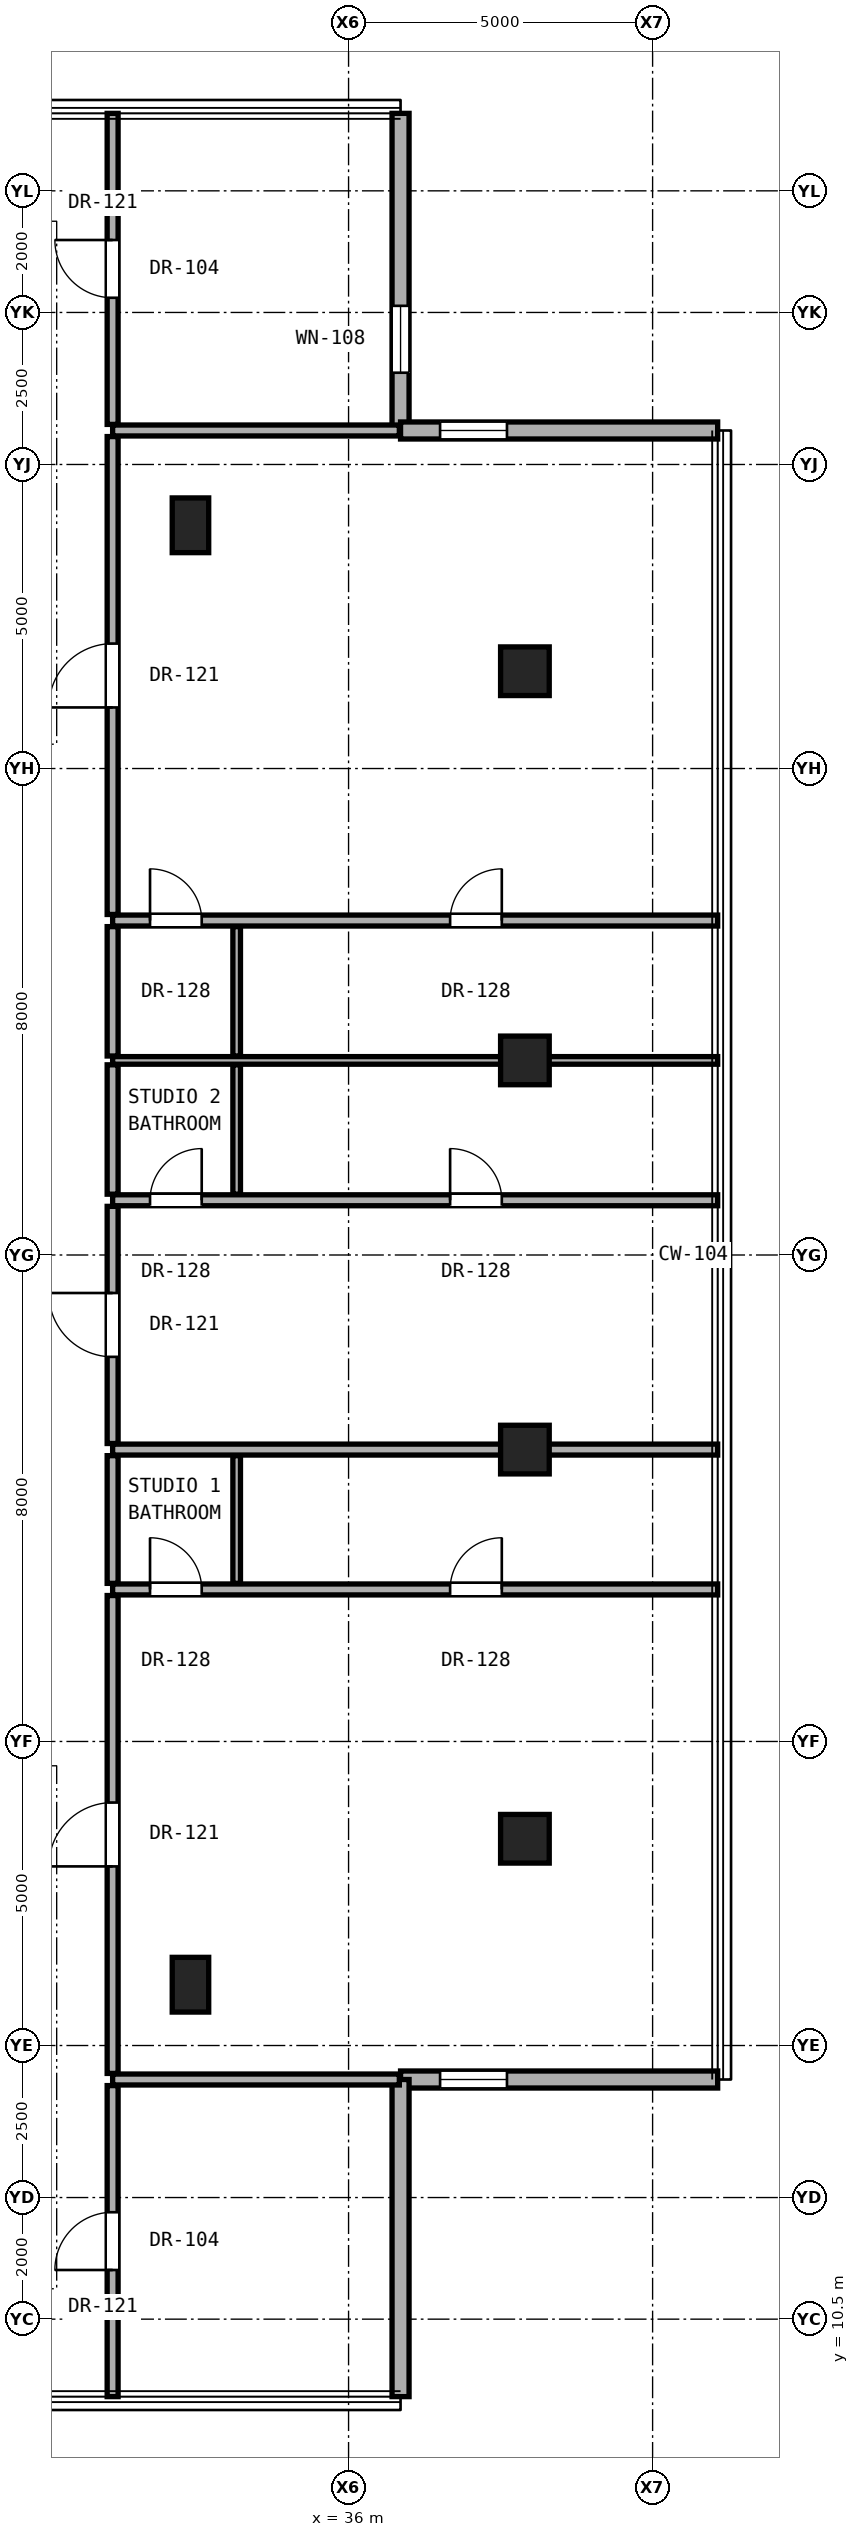
"""IFC4 building model, lengths in metres.
Left out: names, types, materials, properties, quantities, classifications, styles, units other than length and angle.
Written with IfcOpenShell. Run it as: python <this file> out.ifc"""

import sys

from ifc_helpers import new_model, si_unit, direction, frame, frame_2d, origin, origin_2d, place, context, subcontext, project, spatial, rectangle, hollow_rectangle, extrude, element, fill, save


model = new_model("IFC4")
c1 = context("Model", 3, precision=1e-05, world=origin(), true_north=direction((0.0, 1.0)))
c2 = subcontext(c1, "Body", "Model", "MODEL_VIEW")
j1 = project(units=[si_unit("LENGTHUNIT", "METRE"), si_unit("PLANEANGLEUNIT", "RADIAN")], contexts=[c1])
p1 = place(None, origin())
s1 = spatial("IfcSite", under=j1, at=p1, CompositionType="ELEMENT")
p2 = place(p1, origin())
s2 = spatial("IfcBuilding", under=s1, at=p2, CompositionType="ELEMENT")
p3 = place(p2, frame((0.0, 0.0, 209.65)))
s3 = spatial("IfcBuildingStorey", under=s2, at=p3, CompositionType="ELEMENT", Elevation=209.65)
for number, where, z_axis, x_axis in (
    (1, (38.9, 18.4, 0.0), (0.0, 0.0, 1.0), (1.0, 0.0, 0.0)),
    (2, (38.9, 24.8, 0.0), (0.0, 0.0, 1.0), (1.0, 0.0, 0.0)),
    (3, (38.9, 31.2, 0.0), (0.0, 0.0, 1.0), (1.0, 0.0, 0.0)),
    (4, (38.9, 37.6, 0.0), (0.0, 0.0, 1.0), (1.0, 0.0, 0.0)),
):
    element("IfcColumn", number, at=place(p3, frame(where, z_axis=z_axis, x_axis=x_axis)), inside=s3, PredefinedType="COLUMN", context=c2, shape_type="SweptSolid", body=[
        extrude(hollow_rectangle(XDim=0.8, YDim=0.8, WallThickness=0.045, at=origin_2d()), origin(), (0.0, 0.0, 1.0), 3.25),
    ])
for number, where, z_axis, x_axis in (
    (5, (33.4, 16.0, 0.0), (0.0, 0.0, 1.0), (1.0, 0.0, 0.0)),
    (6, (33.4, 40.0, 0.0), (0.0, 0.0, 1.0), (1.0, 0.0, 0.0)),
):
    element("IfcColumn", number, at=place(p3, frame(where, z_axis=z_axis, x_axis=x_axis)), inside=s3, PredefinedType="PILASTER", context=c2, shape_type="SweptSolid", body=[
        extrude(rectangle(XDim=0.6, YDim=0.9, at=origin_2d()), origin(), (0.0, 0.0, 1.0), 3.25),
    ])
p4 = place(p3, frame((36.855, 41.559, 0.0), z_axis=(0.0, 0.0, 1.0), x_axis=(0.0, 1.0, 0.0)))
e7 = element("IfcWall", 7, at=p4, inside=s3, PredefinedType="SOLIDWALL", context=c2, shape_type="SweptSolid", body=[
    extrude(rectangle(XDim=5.215, YDim=0.28, at=frame_2d((2.607, 0.0))), origin(), (0.0, 0.0, 1.0), 2.51),
])
p5 = place(p4, frame((0.95, 0.0, 0.36)))
e8 = element("IfcOpeningElement", 8, at=p5, cuts=e7, PredefinedType="OPENING", context=c2, shape_type="SweptSolid", body=[
    extrude(rectangle(XDim=1.1, YDim=2.0, at=frame_2d((0.55, 1.0))), frame((0.0, 0.15, 0.0), z_axis=(0.0, -1.0, 0.0), x_axis=(1.0, 0.0, 0.0)), (0.0, 0.0, 1.0), 0.3),
])
p6 = place(p3, frame((36.855, 14.441, 0.0), z_axis=(0.0, 0.0, 1.0), x_axis=(1.0, 0.0, 0.0)))
e9 = element("IfcWall", 9, at=p6, inside=s3, PredefinedType="SOLIDWALL", context=c2, shape_type="SweptSolid", body=[
    extrude(rectangle(XDim=5.215, YDim=0.28, at=frame_2d((2.607, 0.0))), origin(), (0.0, 0.0, 1.0), 2.51),
])
p7 = place(p6, frame((0.65, 0.0, 0.36)))
e10 = element("IfcOpeningElement", 10, at=p7, cuts=e9, PredefinedType="OPENING", context=c2, shape_type="SweptSolid", body=[
    extrude(rectangle(XDim=1.1, YDim=2.0, at=frame_2d((0.55, 1.0))), frame((0.0, 0.15, 0.0), z_axis=(0.0, -1.0, 0.0), x_axis=(1.0, 0.0, 0.0)), (0.0, 0.0, 1.0), 0.3),
])
p8 = place(p3, frame((36.855, 9.226, 0.0), z_axis=(0.0, 0.0, 1.0), x_axis=(0.0, 1.0, 0.0)))
e11 = element("IfcWall", 11, at=p8, inside=s3, PredefinedType="SOLIDWALL", context=c2, shape_type="SweptSolid", body=[
    extrude(rectangle(XDim=5.215, YDim=0.28, at=frame_2d((2.607, 0.0))), origin(), (0.0, 0.0, 1.0), 2.51),
])
p9 = place(p3, frame((42.07, 41.559, 0.0), z_axis=(0.0, 0.0, 1.0), x_axis=(-1.0, 0.0, 0.0)))
e12 = element("IfcWall", 12, at=p9, inside=s3, PredefinedType="SOLIDWALL", context=c2, shape_type="SweptSolid", body=[
    extrude(rectangle(XDim=5.215, YDim=0.28, at=frame_2d((2.607, 0.0))), origin(), (0.0, 0.0, 1.0), 2.51),
])
p10 = place(p9, frame((3.465, 0.0, 0.36)))
e13 = element("IfcOpeningElement", 13, at=p10, cuts=e12, PredefinedType="OPENING", context=c2, shape_type="SweptSolid", body=[
    extrude(rectangle(XDim=1.1, YDim=2.0, at=frame_2d((0.55, 1.0))), frame((0.0, 0.15, 0.0), z_axis=(0.0, -1.0, 0.0), x_axis=(1.0, 0.0, 0.0)), (0.0, 0.0, 1.0), 0.3),
])
p11 = place(p3, frame((32.12, 14.441, 0.0), z_axis=(0.0, 0.0, 1.0), x_axis=(1.0, 0.0, 0.0)))
e14 = element("IfcWall", 14, at=p11, inside=s3, PredefinedType="PARTITIONING", context=c2, shape_type="SweptSolid", body=[
    extrude(rectangle(XDim=4.715, YDim=0.18, at=frame_2d((2.357, 0.0))), origin(), (0.0, 0.0, 1.0), 2.89),
])
p12 = place(p3, frame((32.12, 22.5, 0.0), z_axis=(0.0, 0.0, 1.0), x_axis=(1.0, 0.0, 0.0)))
e15 = element("IfcWall", 15, at=p12, inside=s3, PredefinedType="PARTITIONING", context=c2, shape_type="SweptSolid", body=[
    extrude(rectangle(XDim=9.95, YDim=0.18, at=frame_2d((4.975, 0.0))), origin(), (0.0, 0.0, 1.0), 2.109),
])
p13 = place(p12, frame((5.55, 0.0, 0.0)))
e16 = element("IfcOpeningElement", 16, at=p13, cuts=e15, PredefinedType="OPENING", context=c2, shape_type="SweptSolid", body=[
    extrude(rectangle(XDim=0.85, YDim=2.01, at=frame_2d((0.425, 1.005))), frame((0.0, 0.1, 0.0), z_axis=(0.0, -1.0, 0.0), x_axis=(1.0, 0.0, 0.0)), (0.0, 0.0, 1.0), 0.2),
])
p14 = place(p12, frame((0.615, 0.0, 0.0)))
e17 = element("IfcOpeningElement", 17, at=p14, cuts=e15, PredefinedType="OPENING", context=c2, shape_type="SweptSolid", body=[
    extrude(rectangle(XDim=0.85, YDim=2.01, at=frame_2d((0.425, 1.005))), frame((0.0, 0.1, 0.0), z_axis=(0.0, -1.0, 0.0), x_axis=(1.0, 0.0, 0.0)), (0.0, 0.0, 1.0), 0.2),
])
p15 = place(p3, frame((32.12, 24.8, 0.0), z_axis=(0.0, 0.0, 1.0), x_axis=(1.0, 0.0, 0.0)))
e18 = element("IfcWall", 18, at=p15, inside=s3, PredefinedType="PARTITIONING", context=c2, shape_type="SweptSolid", body=[
    extrude(rectangle(XDim=9.95, YDim=0.18, at=frame_2d((4.975, 0.0))), origin(), (0.0, 0.0, 1.0), 2.109),
])
p16 = place(p3, frame((32.12, 28.9, 0.0), z_axis=(0.0, 0.0, 1.0), x_axis=(1.0, 0.0, 0.0)))
e19 = element("IfcWall", 19, at=p16, inside=s3, PredefinedType="PARTITIONING", context=c2, shape_type="SweptSolid", body=[
    extrude(rectangle(XDim=9.95, YDim=0.18, at=frame_2d((4.975, 0.0))), origin(), (0.0, 0.0, 1.0), 2.109),
])
p17 = place(p16, frame((5.55, 0.0, 0.0)))
e20 = element("IfcOpeningElement", 20, at=p17, cuts=e19, PredefinedType="OPENING", context=c2, shape_type="SweptSolid", body=[
    extrude(rectangle(XDim=0.85, YDim=2.01, at=frame_2d((0.425, 1.005))), frame((0.0, 0.1, 0.0), z_axis=(0.0, -1.0, 0.0), x_axis=(1.0, 0.0, 0.0)), (0.0, 0.0, 1.0), 0.2),
])
p18 = place(p16, frame((0.615, 0.0, 0.0)))
e21 = element("IfcOpeningElement", 21, at=p18, cuts=e19, PredefinedType="OPENING", context=c2, shape_type="SweptSolid", body=[
    extrude(rectangle(XDim=0.85, YDim=2.01, at=frame_2d((0.425, 1.005))), frame((0.0, 0.1, 0.0), z_axis=(0.0, -1.0, 0.0), x_axis=(1.0, 0.0, 0.0)), (0.0, 0.0, 1.0), 0.2),
])
p19 = place(p3, frame((32.12, 31.2, 0.0), z_axis=(0.0, 0.0, 1.0), x_axis=(1.0, 0.0, 0.0)))
e22 = element("IfcWall", 22, at=p19, inside=s3, PredefinedType="PARTITIONING", context=c2, shape_type="SweptSolid", body=[
    extrude(rectangle(XDim=9.95, YDim=0.125, at=frame_2d((4.975, 0.0))), origin(), (0.0, 0.0, 1.0), 2.109),
])
p20 = place(p3, frame((32.12, 33.5, 0.0), z_axis=(0.0, 0.0, 1.0), x_axis=(1.0, 0.0, 0.0)))
e23 = element("IfcWall", 23, at=p20, inside=s3, PredefinedType="PARTITIONING", context=c2, shape_type="SweptSolid", body=[
    extrude(rectangle(XDim=9.95, YDim=0.18, at=frame_2d((4.975, 0.0))), origin(), (0.0, 0.0, 1.0), 2.109),
])
p21 = place(p20, frame((5.55, 0.0, 0.0)))
e24 = element("IfcOpeningElement", 24, at=p21, cuts=e23, PredefinedType="OPENING", context=c2, shape_type="SweptSolid", body=[
    extrude(rectangle(XDim=0.85, YDim=2.01, at=frame_2d((0.425, 1.005))), frame((0.0, 0.1, 0.0), z_axis=(0.0, -1.0, 0.0), x_axis=(1.0, 0.0, 0.0)), (0.0, 0.0, 1.0), 0.2),
])
p22 = place(p20, frame((0.615, 0.0, 0.0)))
e25 = element("IfcOpeningElement", 25, at=p22, cuts=e23, PredefinedType="OPENING", context=c2, shape_type="SweptSolid", body=[
    extrude(rectangle(XDim=0.85, YDim=2.01, at=frame_2d((0.425, 1.005))), frame((0.0, 0.1, 0.0), z_axis=(0.0, -1.0, 0.0), x_axis=(1.0, 0.0, 0.0)), (0.0, 0.0, 1.0), 0.2),
])
p23 = place(p3, frame((32.12, 41.559, 0.0), z_axis=(0.0, 0.0, 1.0), x_axis=(1.0, 0.0, 0.0)))
e26 = element("IfcWall", 26, at=p23, inside=s3, PredefinedType="PARTITIONING", context=c2, shape_type="SweptSolid", body=[
    extrude(rectangle(XDim=4.715, YDim=0.18, at=frame_2d((2.357, 0.0))), origin(), (0.0, 0.0, 1.0), 2.89),
])
p24 = place(p3, frame((32.12, 9.226, 0.0), z_axis=(0.0, 0.0, 1.0), x_axis=(0.0, 1.0, 0.0)))
e27 = element("IfcWall", 27, at=p24, inside=s3, PredefinedType="PARTITIONING", context=c2, shape_type="SweptSolid", body=[
    extrude(rectangle(XDim=5.115, YDim=0.18, at=frame_2d((2.558, 0.0))), origin(), (0.0, 0.0, 1.0), 2.89),
])
p25 = place(p24, frame((2.083, 0.0, 0.0)))
e28 = element("IfcOpeningElement", 28, at=p25, cuts=e27, PredefinedType="OPENING", context=c2, shape_type="SweptSolid", body=[
    extrude(rectangle(XDim=0.95, YDim=2.15, at=frame_2d((0.475, 1.075))), frame((0.0, 0.1, 0.0), z_axis=(0.0, -1.0, 0.0), x_axis=(1.0, 0.0, 0.0)), (0.0, 0.0, 1.0), 0.2),
])
p26 = place(p3, frame((32.12, 14.541, 0.0), z_axis=(0.0, 0.0, 1.0), x_axis=(0.0, 1.0, 0.0)))
e29 = element("IfcWall", 29, at=p26, inside=s3, PredefinedType="PARTITIONING", context=c2, shape_type="SweptSolid", body=[
    extrude(rectangle(XDim=7.859, YDim=0.18, at=frame_2d((3.929, 0.0))), origin(), (0.0, 0.0, 1.0), 2.282),
])
p27 = place(p26, frame((3.405, 0.0, 0.0)))
e30 = element("IfcOpeningElement", 30, at=p27, cuts=e29, PredefinedType="OPENING", context=c2, shape_type="SweptSolid", body=[
    extrude(rectangle(XDim=1.05, YDim=2.2, at=frame_2d((0.525, 1.1))), frame((0.0, 0.1, 0.0), z_axis=(0.0, -1.0, 0.0), x_axis=(1.0, 0.0, 0.0)), (0.0, 0.0, 1.0), 0.2),
])
p28 = place(p3, frame((32.12, 22.6, 0.0), z_axis=(0.0, 0.0, 1.0), x_axis=(0.0, 1.0, 0.0)))
e31 = element("IfcWall", 31, at=p28, inside=s3, PredefinedType="PARTITIONING", context=c2, shape_type="SweptSolid", body=[
    extrude(rectangle(XDim=2.1, YDim=0.18, at=frame_2d((1.05, 0.0))), origin(), (0.0, 0.0, 1.0), 2.266),
])
p29 = place(p3, frame((32.12, 24.9, 0.0), z_axis=(0.0, 0.0, 1.0), x_axis=(0.0, 1.0, 0.0)))
e32 = element("IfcWall", 32, at=p29, inside=s3, PredefinedType="PARTITIONING", context=c2, shape_type="SweptSolid", body=[
    extrude(rectangle(XDim=3.9, YDim=0.18, at=frame_2d((1.95, 0.0))), origin(), (0.0, 0.0, 1.0), 2.266),
])
p30 = place(p29, frame((1.425, 0.0, 0.0)))
e33 = element("IfcOpeningElement", 33, at=p30, cuts=e32, PredefinedType="OPENING", context=c2, shape_type="SweptSolid", body=[
    extrude(rectangle(XDim=1.05, YDim=2.2, at=frame_2d((0.525, 1.1))), frame((0.0, 0.1, 0.0), z_axis=(0.0, -1.0, 0.0), x_axis=(1.0, 0.0, 0.0)), (0.0, 0.0, 1.0), 0.2),
])
for number, where, z_axis, x_axis in (
    (34, (32.12, 29.0, 0.0), (0.0, 0.0, 1.0), (0.0, 1.0, 0.0)),
    (35, (32.12, 31.272, 0.0), (0.0, 0.0, 1.0), (0.0, 1.0, 0.0)),
):
    element("IfcWall", number, at=place(p3, frame(where, z_axis=z_axis, x_axis=x_axis)), inside=s3, PredefinedType="PARTITIONING", context=c2, shape_type="SweptSolid", body=[
        extrude(rectangle(XDim=2.127, YDim=0.18, at=frame_2d((1.064, 0.0))), origin(), (0.0, 0.0, 1.0), 2.266),
    ])
p31 = place(p3, frame((32.12, 33.6, 0.0), z_axis=(0.0, 0.0, 1.0), x_axis=(0.0, 1.0, 0.0)))
e36 = element("IfcWall", 36, at=p31, inside=s3, PredefinedType="PARTITIONING", context=c2, shape_type="SweptSolid", body=[
    extrude(rectangle(XDim=7.859, YDim=0.18, at=frame_2d((3.929, 0.0))), origin(), (0.0, 0.0, 1.0), 2.282),
])
p32 = place(p31, frame((3.405, 0.0, 0.0)))
e37 = element("IfcOpeningElement", 37, at=p32, cuts=e36, PredefinedType="OPENING", context=c2, shape_type="SweptSolid", body=[
    extrude(rectangle(XDim=1.05, YDim=2.2, at=frame_2d((0.525, 1.1))), frame((0.0, 0.1, 0.0), z_axis=(0.0, -1.0, 0.0), x_axis=(1.0, 0.0, 0.0)), (0.0, 0.0, 1.0), 0.2),
])
p33 = place(p3, frame((32.12, 41.659, 0.0), z_axis=(0.0, 0.0, 1.0), x_axis=(0.0, 1.0, 0.0)))
e38 = element("IfcWall", 38, at=p33, inside=s3, PredefinedType="PARTITIONING", context=c2, shape_type="SweptSolid", body=[
    extrude(rectangle(XDim=5.115, YDim=0.18, at=frame_2d((2.558, 0.0))), origin(), (0.0, 0.0, 1.0), 2.89),
])
p34 = place(p33, frame((2.083, 0.0, 0.0)))
e39 = element("IfcOpeningElement", 39, at=p34, cuts=e38, PredefinedType="OPENING", context=c2, shape_type="SweptSolid", body=[
    extrude(rectangle(XDim=0.95, YDim=2.15, at=frame_2d((0.475, 1.075))), frame((0.0, 0.1, 0.0), z_axis=(0.0, -1.0, 0.0), x_axis=(1.0, 0.0, 0.0)), (0.0, 0.0, 1.0), 0.2),
])
p35 = place(p3, frame((34.16, 22.6, 0.0), z_axis=(0.0, 0.0, 1.0), x_axis=(0.0, 1.0, 0.0)))
e40 = element("IfcWall", 40, at=p35, inside=s3, PredefinedType="PARTITIONING", context=c2, shape_type="SweptSolid", body=[
    extrude(rectangle(XDim=2.1, YDim=0.125, at=frame_2d((1.05, 0.0))), origin(), (0.0, 0.0, 1.0), 2.266),
])
for number, where, z_axis, x_axis in (
    (41, (34.16, 29.0, 0.0), (0.0, 0.0, 1.0), (0.0, 1.0, 0.0)),
    (42, (34.16, 31.272, 0.0), (0.0, 0.0, 1.0), (0.0, 1.0, 0.0)),
):
    element("IfcWall", number, at=place(p3, frame(where, z_axis=z_axis, x_axis=x_axis)), inside=s3, PredefinedType="PARTITIONING", context=c2, shape_type="SweptSolid", body=[
        extrude(rectangle(XDim=2.127, YDim=0.125, at=frame_2d((1.064, 0.0))), origin(), (0.0, 0.0, 1.0), 2.266),
    ])
p36 = place(p5, origin())
e43 = element("IfcWindow", 43, at=p36, inside=s3, PartitioningType="SINGLE_PANEL", PredefinedType="WINDOW", context=c2, shape_type="SweptSolid", body=[
    extrude(rectangle(XDim=1.1, YDim=2.0, at=frame_2d((0.55, 1.0))), frame((0.0, 0.03, 0.0), z_axis=(0.0, -1.0, 0.0), x_axis=(1.0, 0.0, 0.0)), (0.0, 0.0, 1.0), 0.06),
])
fill(e8, e43)
p37 = place(p7, origin())
e44 = element("IfcWindow", 44, at=p37, inside=s3, PartitioningType="SINGLE_PANEL", PredefinedType="WINDOW", context=c2, shape_type="SweptSolid", body=[
    extrude(rectangle(XDim=1.1, YDim=2.0, at=frame_2d((0.55, 1.0))), frame((0.0, 0.03, 0.0), z_axis=(0.0, -1.0, 0.0), x_axis=(1.0, 0.0, 0.0)), (0.0, 0.0, 1.0), 0.06),
])
fill(e10, e44)
p38 = place(p10, origin())
e45 = element("IfcWindow", 45, at=p38, inside=s3, PartitioningType="SINGLE_PANEL", PredefinedType="WINDOW", context=c2, shape_type="SweptSolid", body=[
    extrude(rectangle(XDim=1.1, YDim=2.0, at=frame_2d((0.55, 1.0))), frame((0.0, 0.03, 0.0), z_axis=(0.0, -1.0, 0.0), x_axis=(1.0, 0.0, 0.0)), (0.0, 0.0, 1.0), 0.06),
])
fill(e13, e45)
p39 = place(p27, origin())
e46 = element("IfcDoor", 46, at=p39, inside=s3, OperationType="SINGLE_SWING_LEFT", PredefinedType="DOOR", context=c2, shape_type="SweptSolid", body=[
    extrude(rectangle(XDim=1.05, YDim=2.2, at=frame_2d((0.525, 1.1))), frame((0.0, 0.025, 0.0), z_axis=(0.0, -1.0, 0.0), x_axis=(1.0, 0.0, 0.0)), (0.0, 0.0, 1.0), 0.05),
])
fill(e30, e46)
p40 = place(p13, origin())
e47 = element("IfcDoor", 47, at=p40, inside=s3, OperationType="SINGLE_SWING_RIGHT", PredefinedType="DOOR", context=c2, shape_type="SweptSolid", body=[
    extrude(rectangle(XDim=0.85, YDim=2.01, at=frame_2d((0.425, 1.005))), frame((0.0, 0.025, 0.0), z_axis=(0.0, -1.0, 0.0), x_axis=(1.0, 0.0, 0.0)), (0.0, 0.0, 1.0), 0.05),
])
fill(e16, e47)
p41 = place(p14, origin())
e48 = element("IfcDoor", 48, at=p41, inside=s3, OperationType="SINGLE_SWING_LEFT", PredefinedType="DOOR", context=c2, shape_type="SweptSolid", body=[
    extrude(rectangle(XDim=0.85, YDim=2.01, at=frame_2d((0.425, 1.005))), frame((0.0, 0.025, 0.0), z_axis=(0.0, -1.0, 0.0), x_axis=(1.0, 0.0, 0.0)), (0.0, 0.0, 1.0), 0.05),
])
fill(e17, e48)
p42 = place(p30, origin())
e49 = element("IfcDoor", 49, at=p42, inside=s3, OperationType="SINGLE_SWING_RIGHT", PredefinedType="DOOR", context=c2, shape_type="SweptSolid", body=[
    extrude(rectangle(XDim=1.05, YDim=2.2, at=frame_2d((0.525, 1.1))), frame((0.0, 0.025, 0.0), z_axis=(0.0, -1.0, 0.0), x_axis=(1.0, 0.0, 0.0)), (0.0, 0.0, 1.0), 0.05),
])
fill(e33, e49)
p43 = place(p17, origin())
e50 = element("IfcDoor", 50, at=p43, inside=s3, OperationType="SINGLE_SWING_LEFT", PredefinedType="DOOR", context=c2, shape_type="SweptSolid", body=[
    extrude(rectangle(XDim=0.85, YDim=2.01, at=frame_2d((0.425, 1.005))), frame((0.0, 0.025, 0.0), z_axis=(0.0, -1.0, 0.0), x_axis=(1.0, 0.0, 0.0)), (0.0, 0.0, 1.0), 0.05),
])
fill(e20, e50)
p44 = place(p18, origin())
e51 = element("IfcDoor", 51, at=p44, inside=s3, OperationType="SINGLE_SWING_RIGHT", PredefinedType="DOOR", context=c2, shape_type="SweptSolid", body=[
    extrude(rectangle(XDim=0.85, YDim=2.01, at=frame_2d((0.425, 1.005))), frame((0.0, 0.025, 0.0), z_axis=(0.0, -1.0, 0.0), x_axis=(1.0, 0.0, 0.0)), (0.0, 0.0, 1.0), 0.05),
])
fill(e21, e51)
p45 = place(p32, origin())
e52 = element("IfcDoor", 52, at=p45, inside=s3, OperationType="SINGLE_SWING_LEFT", PredefinedType="DOOR", context=c2, shape_type="SweptSolid", body=[
    extrude(rectangle(XDim=1.05, YDim=2.2, at=frame_2d((0.525, 1.1))), frame((0.0, 0.025, 0.0), z_axis=(0.0, -1.0, 0.0), x_axis=(1.0, 0.0, 0.0)), (0.0, 0.0, 1.0), 0.05),
])
fill(e37, e52)
p46 = place(p21, origin())
e53 = element("IfcDoor", 53, at=p46, inside=s3, OperationType="SINGLE_SWING_RIGHT", PredefinedType="DOOR", context=c2, shape_type="SweptSolid", body=[
    extrude(rectangle(XDim=0.85, YDim=2.01, at=frame_2d((0.425, 1.005))), frame((0.0, 0.025, 0.0), z_axis=(0.0, -1.0, 0.0), x_axis=(1.0, 0.0, 0.0)), (0.0, 0.0, 1.0), 0.05),
])
fill(e24, e53)
p47 = place(p22, origin())
e54 = element("IfcDoor", 54, at=p47, inside=s3, OperationType="SINGLE_SWING_LEFT", PredefinedType="DOOR", context=c2, shape_type="SweptSolid", body=[
    extrude(rectangle(XDim=0.85, YDim=2.01, at=frame_2d((0.425, 1.005))), frame((0.0, 0.025, 0.0), z_axis=(0.0, -1.0, 0.0), x_axis=(1.0, 0.0, 0.0)), (0.0, 0.0, 1.0), 0.05),
])
fill(e25, e54)
p48 = place(p25, origin())
e55 = element("IfcDoor", 55, at=p48, inside=s3, OperationType="SINGLE_SWING_LEFT", PredefinedType="DOOR", context=c2, shape_type="SweptSolid", body=[
    extrude(rectangle(XDim=0.95, YDim=2.15, at=frame_2d((0.475, 1.075))), frame((0.0, 0.025, 0.0), z_axis=(0.0, -1.0, 0.0), x_axis=(1.0, 0.0, 0.0)), (0.0, 0.0, 1.0), 0.05),
])
fill(e28, e55)
p49 = place(p34, origin())
e56 = element("IfcDoor", 56, at=p49, inside=s3, OperationType="SINGLE_SWING_RIGHT", PredefinedType="DOOR", context=c2, shape_type="SweptSolid", body=[
    extrude(rectangle(XDim=0.95, YDim=2.15, at=frame_2d((0.475, 1.075))), frame((0.0, 0.025, 0.0), z_axis=(0.0, -1.0, 0.0), x_axis=(1.0, 0.0, 0.0)), (0.0, 0.0, 1.0), 0.05),
])
fill(e39, e56)
save(model, sys.argv[1])
